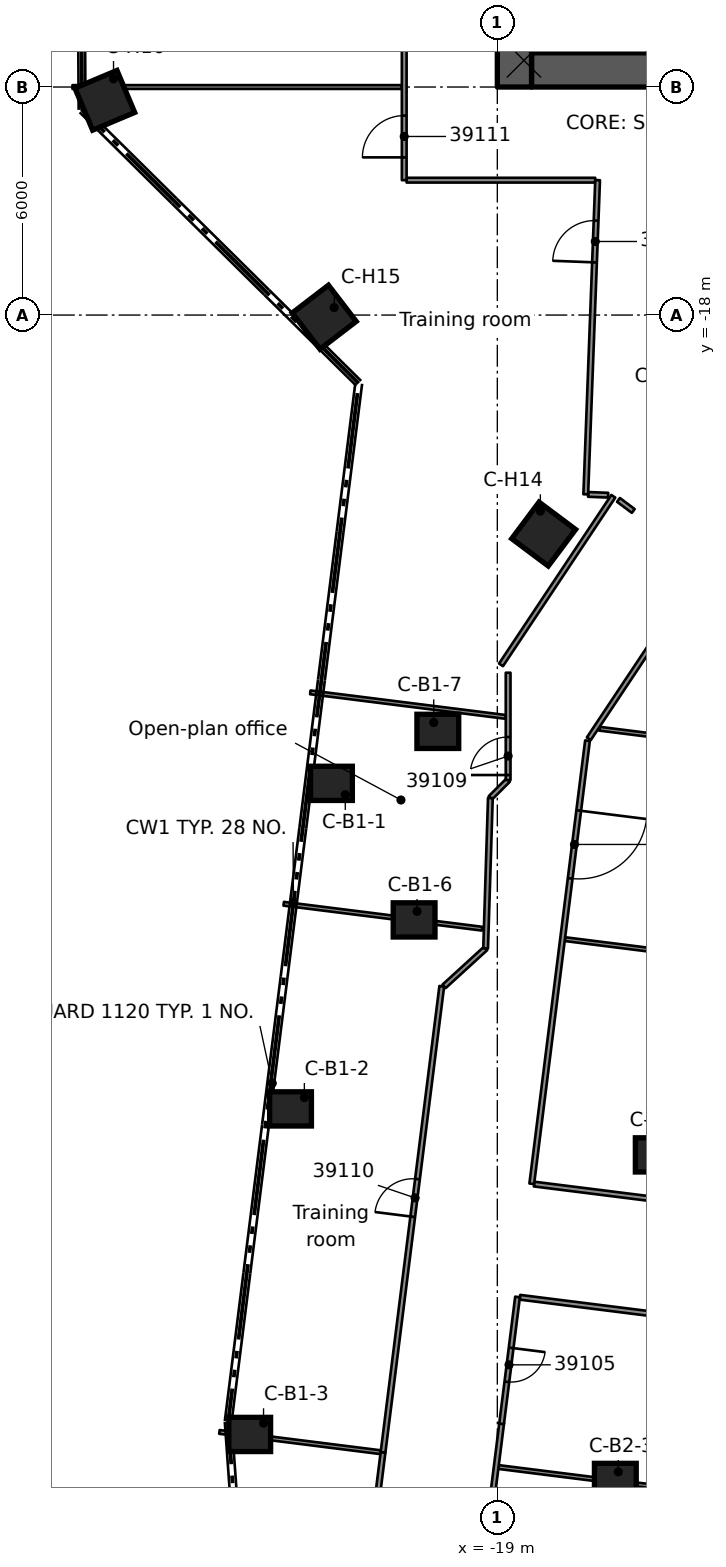
"""IFC4 building model, lengths in metres.
Left out: names, types, materials, properties, quantities, classifications, styles, units other than length and angle.
Written with IfcOpenShell. Run it as: python <this file> out.ifc"""

import sys

from ifc_helpers import new_model, si_unit, direction, frame, frame_2d, origin, origin_2d, place, context, subcontext, project, spatial, rectangle, extrude, element, fill, save


model = new_model("IFC4")
c1 = context("Model", 3, precision=1e-05, world=origin(), true_north=direction((0.0, 1.0)))
c2 = subcontext(c1, "Body", "Model", "MODEL_VIEW")
j1 = project(units=[si_unit("LENGTHUNIT", "METRE"), si_unit("PLANEANGLEUNIT", "RADIAN")], contexts=[c1])
p1 = place(None, origin())
s1 = spatial("IfcSite", under=j1, at=p1, CompositionType="ELEMENT")
p2 = place(p1, origin())
s2 = spatial("IfcBuilding", under=s1, at=p2, CompositionType="ELEMENT")
p3 = place(p2, frame((0.0, 0.0, 192.1)))
s3 = spatial("IfcBuildingStorey", under=s2, at=p3, CompositionType="ELEMENT", Elevation=192.1)
p4 = place(p3, frame((-18.1, -11.55, 0.0), z_axis=(0.0, 0.0, 1.0), x_axis=(1.0, 0.0, 0.0)))
e1 = element("IfcWall", 1, at=p4, inside=s3, PredefinedType="SHEAR", context=c2, shape_type="SweptSolid", body=[
    extrude(rectangle(XDim=9.2, YDim=0.9, at=frame_2d((4.6, 0.0))), origin(), (0.0, 0.0, 1.0), 3.5),
])
p5 = place(p4, frame((5.1, 0.0, 0.0)))
e2 = element("IfcOpeningElement", 2, at=p5, cuts=e1, PredefinedType="OPENING", context=c2, shape_type="SweptSolid", body=[
    extrude(rectangle(XDim=1.1, YDim=2.1, at=frame_2d((0.55, 1.05))), frame((0.0, 0.46, 0.0), z_axis=(0.0, -1.0, 0.0), x_axis=(1.0, 0.0, 0.0)), (0.0, 0.0, 1.0), 0.92),
])
p6 = place(p4, frame((7.53, 0.0, 0.0)))
e3 = element("IfcOpeningElement", 3, at=p6, cuts=e1, PredefinedType="OPENING", context=c2, shape_type="SweptSolid", body=[
    extrude(rectangle(XDim=0.9, YDim=2.1, at=frame_2d((0.45, 1.05))), frame((0.0, 0.46, 0.0), z_axis=(0.0, -1.0, 0.0), x_axis=(1.0, 0.0, 0.0)), (0.0, 0.0, 1.0), 0.92),
])
p7 = place(p3, frame((-18.55, -12.0, 0.0), z_axis=(0.0, 0.0, 1.0), x_axis=(0.0, 1.0, 0.0)))
e4 = element("IfcWall", 4, at=p7, inside=s3, PredefinedType="SHEAR", context=c2, shape_type="SweptSolid", body=[
    extrude(rectangle(XDim=24.0, YDim=0.9, at=frame_2d((12.0, 0.0))), origin(), (0.0, 0.0, 1.0), 3.5),
])
p8 = place(p7, frame((10.1, 0.0, 0.0)))
e5 = element("IfcOpeningElement", 5, at=p8, cuts=e4, PredefinedType="OPENING", context=c2, shape_type="SweptSolid", body=[
    extrude(rectangle(XDim=1.8, YDim=2.1, at=frame_2d((0.9, 1.05))), frame((0.0, 0.46, 0.0), z_axis=(0.0, -1.0, 0.0), x_axis=(1.0, 0.0, 0.0)), (0.0, 0.0, 1.0), 0.92),
])
for number, where, z_axis, x_axis in (
    (6, (-23.365, -30.322, 0.0), (0.0, 0.0, 1.0), (1.0, 0.0, 0.0)),
    (7, (-24.442, -38.888, 0.0), (0.0, 0.0, 1.0), (1.0, 0.0, 0.0)),
    (8, (-25.516, -47.454, 0.0), (0.0, 0.0, 1.0), (1.0, 0.0, 0.0)),
    (9, (-21.19, -33.915, 0.0), (0.0, 0.0, 1.0), (1.0, 0.0, 0.0)),
    (10, (-20.566, -28.954, 0.0), (0.0, 0.0, 1.0), (1.0, 0.0, 0.0)),
    (11, (-14.818, -40.098, 0.0), (0.0, 0.0, 1.0), (1.0, 0.0, 0.0)),
    (12, (-15.895, -48.664, 0.0), (0.0, 0.0, 1.0), (1.0, 0.0, 0.0)),
):
    element("IfcColumn", number, at=place(p3, frame(where, z_axis=z_axis, x_axis=x_axis)), inside=s3, PredefinedType="COLUMN", context=c2, shape_type="SweptSolid", body=[
        extrude(rectangle(XDim=1.1, YDim=0.9, at=origin_2d()), origin(), (0.0, 0.0, 1.0), 3.5),
    ])
for number, where, z_axis, x_axis in (
    (13, (-17.781, -23.763, 0.0), (0.0, 0.0, 1.0), (-0.599, -0.801, 0.0)),
    (14, (-23.555, -18.056, 0.0), (0.0, 0.0, 1.0), (-0.794, -0.608, 0.0)),
    (15, (-29.329, -12.349, 0.0), (0.0, 0.0, 1.0), (-0.922, -0.388, 0.0)),
):
    element("IfcColumn", number, at=place(p3, frame(where, z_axis=z_axis, x_axis=x_axis)), inside=s3, PredefinedType="COLUMN", context=c2, shape_type="SweptSolid", body=[
        extrude(rectangle(XDim=1.2, YDim=1.2, at=origin_2d()), origin(), (0.0, 0.0, 1.0), 3.5),
    ])
p9 = place(p3, frame((-15.812, -22.864, 0.0), z_axis=(0.0, 0.0, 1.0), x_axis=(0.800662960461, -0.599115033817, 0.0)))
e16 = element("IfcWall", 16, at=p9, inside=s3, PredefinedType="PARTITIONING", context=c2, shape_type="SweptSolid", body=[
    extrude(rectangle(XDim=0.486, YDim=0.125, at=frame_2d((0.243, 0.0))), origin(), (0.0, 0.0, 1.0), 3.06),
])
p10 = place(p3, frame((-26.313, -47.387, 0.0), z_axis=(0.0, 0.0, 1.0), x_axis=(0.992174773364, -0.124856794369, 0.0)))
e17 = element("IfcWall", 17, at=p10, inside=s3, PredefinedType="PARTITIONING", context=c2, shape_type="SweptSolid", body=[
    extrude(rectangle(XDim=4.276, YDim=0.1, at=frame_2d((2.138, 0.0))), origin(), (0.0, 0.0, 1.0), 3.06),
])
p11 = place(p3, frame((-18.968, -48.311, 0.0), z_axis=(0.0, 0.0, 1.0), x_axis=(0.992187328306, -0.124756985971, 0.0)))
e18 = element("IfcWall", 18, at=p11, inside=s3, PredefinedType="PARTITIONING", context=c2, shape_type="SweptSolid", body=[
    extrude(rectangle(XDim=25.585, YDim=0.1, at=frame_2d((12.792, 0.0))), origin(), (0.0, 0.0, 1.0), 3.06),
])
p12 = place(p3, frame((6.979, -47.035, 0.0), z_axis=(0.0, 0.0, 1.0), x_axis=(-0.992192052325, 0.124719410292, 0.0)))
e19 = element("IfcWall", 19, at=p12, inside=s3, PredefinedType="PARTITIONING", context=c2, shape_type="SweptSolid", body=[
    extrude(rectangle(XDim=25.585, YDim=0.125, at=frame_2d((12.792, 0.0))), origin(), (0.0, 0.0, 1.0), 3.06),
])
p13 = place(p12, frame((12.288, 0.0, 0.0)))
e20 = element("IfcOpeningElement", 20, at=p13, cuts=e19, PredefinedType="OPENING", context=c2, shape_type="SweptSolid", body=[
    extrude(rectangle(XDim=0.9, YDim=2.1, at=frame_2d((0.45, 1.05))), frame((0.0, 0.073, 0.0), z_axis=(0.0, -1.0, 0.0), x_axis=(1.0, 0.0, 0.0)), (0.0, 0.0, 1.0), 0.145),
])
p14 = place(p3, frame((-18.032, -40.866, 0.0), z_axis=(0.0, 0.0, 1.0), x_axis=(0.9922120451, -0.124560256738, 0.0)))
e21 = element("IfcWall", 21, at=p14, inside=s3, PredefinedType="PARTITIONING", context=c2, shape_type="SweptSolid", body=[
    extrude(rectangle(XDim=24.414, YDim=0.125, at=frame_2d((12.207, 0.0))), origin(), (0.0, 0.0, 1.0), 3.06),
])
p15 = place(p3, frame((-24.621, -33.49, 0.0), z_axis=(0.0, 0.0, 1.0), x_axis=(0.992192670487, -0.124714492473, 0.0)))
e22 = element("IfcWall", 22, at=p15, inside=s3, PredefinedType="PARTITIONING", context=c2, shape_type="SweptSolid", body=[
    extrude(rectangle(XDim=5.26, YDim=0.1, at=frame_2d((2.63, 0.0))), origin(), (0.0, 0.0, 1.0), 3.06),
])
p16 = place(p3, frame((-17.221, -34.421, 0.0), z_axis=(0.0, 0.0, 1.0), x_axis=(0.992190871449, -0.124728804262, 0.0)))
e23 = element("IfcWall", 23, at=p16, inside=s3, PredefinedType="PARTITIONING", context=c2, shape_type="SweptSolid", body=[
    extrude(rectangle(XDim=25.585, YDim=0.1, at=frame_2d((12.792, 0.0))), origin(), (0.0, 0.0, 1.0), 3.06),
])
p17 = place(p3, frame((-23.921, -27.927, 0.0), z_axis=(0.0, 0.0, 1.0), x_axis=(0.992179743224, -0.124817295018, 0.0)))
e24 = element("IfcWall", 24, at=p17, inside=s3, PredefinedType="PARTITIONING", context=c2, shape_type="SweptSolid", body=[
    extrude(rectangle(XDim=5.183, YDim=0.1, at=frame_2d((2.592, 0.0))), origin(), (0.0, 0.0, 1.0), 3.06),
])
p18 = place(p3, frame((-16.315, -28.884, 0.0), z_axis=(0.0, 0.0, 1.0), x_axis=(0.992194172305, -0.124702543857, 0.0)))
e25 = element("IfcWall", 25, at=p18, inside=s3, PredefinedType="PARTITIONING", context=c2, shape_type="SweptSolid", body=[
    extrude(rectangle(XDim=24.521, YDim=0.1, at=frame_2d((12.261, 0.0))), origin(), (0.0, 0.0, 1.0), 3.06),
])
p19 = place(p3, frame((-16.61, -22.719, 0.0), z_axis=(0.0, 0.0, 1.0), x_axis=(0.999204657851, -0.039875452703, 0.0)))
e26 = element("IfcWall", 26, at=p19, inside=s3, PredefinedType="PARTITIONING", context=c2, shape_type="SweptSolid", body=[
    extrude(rectangle(XDim=0.527, YDim=0.125, at=frame_2d((0.263, 0.0))), origin(), (0.0, 0.0, 1.0), 3.06),
])
p20 = place(p3, frame((-20.402, -35.664, 0.0), z_axis=(0.0, 0.0, 1.0), x_axis=(0.738431976745, 0.674327973408, 0.0)))
e27 = element("IfcWall", 27, at=p20, inside=s3, PredefinedType="PARTITIONING", context=c2, shape_type="SweptSolid", body=[
    extrude(rectangle(XDim=1.481, YDim=0.125, at=frame_2d((0.741, 0.0))), origin(), (0.0, 0.0, 1.0), 3.06),
])
p21 = place(p3, frame((-19.182, -30.703, 0.0), z_axis=(0.0, 0.0, 1.0), x_axis=(0.707106781187, 0.707106781187, 0.0)))
e28 = element("IfcWall", 28, at=p21, inside=s3, PredefinedType="PARTITIONING", context=c2, shape_type="SweptSolid", body=[
    extrude(rectangle(XDim=0.659, YDim=0.125, at=frame_2d((0.329, 0.0))), origin(), (0.0, 0.0, 1.0), 3.06),
])
p22 = place(p3, frame((-21.387, -14.451, 0.0), z_axis=(0.0, 0.0, 1.0), x_axis=(1.0, 0.0, 0.0)))
e29 = element("IfcWall", 29, at=p22, inside=s3, PredefinedType="PARTITIONING", context=c2, shape_type="SweptSolid", body=[
    extrude(rectangle(XDim=4.963, YDim=0.125, at=frame_2d((2.481, 0.0))), origin(), (0.0, 0.0, 1.0), 3.06),
])
p23 = place(p3, frame((-30.18, -12.0, 0.0), z_axis=(0.0, 0.0, 1.0), x_axis=(1.0, 0.0, 0.0)))
e30 = element("IfcWall", 30, at=p23, inside=s3, PredefinedType="PARTITIONING", context=c2, shape_type="SweptSolid", body=[
    extrude(rectangle(XDim=8.668, YDim=0.1, at=frame_2d((4.334, 0.0))), origin(), (0.0, 0.0, 1.0), 3.06),
])
p24 = place(p3, frame((-13.009, -23.769, 0.0), z_axis=(0.0, 0.0, 1.0), x_axis=(-0.554421269435, -0.832236178016, 0.0)))
e31 = element("IfcWall", 31, at=p24, inside=s3, PredefinedType="PARTITIONING", context=c2, shape_type="SweptSolid", body=[
    extrude(rectangle(XDim=6.464, YDim=0.125, at=frame_2d((3.232, 0.0))), origin(), (0.0, 0.0, 1.0), 3.06),
])
p25 = place(p3, frame((-15.948, -22.768, 0.0), z_axis=(0.0, 0.0, 1.0), x_axis=(-0.554404200785, -0.832247548601, 0.0)))
e32 = element("IfcWall", 32, at=p25, inside=s3, PredefinedType="PARTITIONING", context=c2, shape_type="SweptSolid", body=[
    extrude(rectangle(XDim=5.33, YDim=0.125, at=frame_2d((2.665, 0.0))), origin(), (0.0, 0.0, 1.0), 3.06),
])
p26 = place(p3, frame((-19.183, -30.708, 0.0), z_axis=(0.0, 0.0, 1.0), x_axis=(-0.0315735891, -0.99950142995, 0.0)))
e33 = element("IfcWall", 33, at=p26, inside=s3, PredefinedType="PARTITIONING", context=c2, shape_type="SweptSolid", body=[
    extrude(rectangle(XDim=3.959, YDim=0.125, at=frame_2d((1.979, 0.0))), origin(), (0.0, 0.0, 1.0), 3.06),
])
p27 = place(p3, frame((-18.884, -47.146, 0.0), z_axis=(0.0, 0.0, 1.0), x_axis=(-0.124739851626, -0.992189482617, 0.0)))
e34 = element("IfcWall", 34, at=p27, inside=s3, PredefinedType="PARTITIONING", context=c2, shape_type="SweptSolid", body=[
    extrude(rectangle(XDim=3.366, YDim=0.125, at=frame_2d((1.683, 0.0))), origin(), (0.0, 0.0, 1.0), 3.06),
])
p28 = place(p3, frame((-18.468, -43.836, 0.0), z_axis=(0.0, 0.0, 1.0), x_axis=(-0.124739851626, -0.992189482617, 0.0)))
e35 = element("IfcWall", 35, at=p28, inside=s3, PredefinedType="PARTITIONING", context=c2, shape_type="SweptSolid", body=[
    extrude(rectangle(XDim=3.366, YDim=0.125, at=frame_2d((1.683, 0.0))), origin(), (0.0, 0.0, 1.0), 3.06),
])
p29 = place(p28, frame((1.35, 0.0, 0.0)))
e36 = element("IfcOpeningElement", 36, at=p29, cuts=e35, PredefinedType="OPENING", context=c2, shape_type="SweptSolid", body=[
    extrude(rectangle(XDim=0.9, YDim=2.1, at=frame_2d((0.45, 1.05))), frame((0.0, 0.073, 0.0), z_axis=(0.0, -1.0, 0.0), x_axis=(1.0, 0.0, 0.0)), (0.0, 0.0, 1.0), 0.145),
])
p30 = place(p3, frame((-16.627, -29.199, 0.0), z_axis=(0.0, 0.0, 1.0), x_axis=(-0.124845291818, -0.992176220795, 0.0)))
e37 = element("IfcWall", 37, at=p30, inside=s3, PredefinedType="PARTITIONING", context=c2, shape_type="SweptSolid", body=[
    extrude(rectangle(XDim=11.751, YDim=0.125, at=frame_2d((5.875, 0.0))), origin(), (0.0, 0.0, 1.0), 3.06),
])
p31 = place(p30, frame((1.852, 0.0, 0.0)))
e38 = element("IfcOpeningElement", 38, at=p31, cuts=e37, PredefinedType="OPENING", context=c2, shape_type="SweptSolid", body=[
    extrude(rectangle(XDim=1.8, YDim=2.1, at=frame_2d((0.9, 1.05))), frame((0.0, 0.073, 0.0), z_axis=(0.0, -1.0, 0.0), x_axis=(1.0, 0.0, 0.0)), (0.0, 0.0, 1.0), 0.145),
])
p32 = place(p3, frame((-22.008, -47.929, 0.0), z_axis=(0.0, 0.0, 1.0), x_axis=(0.125040719406, 0.992151610637, 0.0)))
e39 = element("IfcWall", 39, at=p32, inside=s3, PredefinedType="PARTITIONING", context=c2, shape_type="SweptSolid", body=[
    extrude(rectangle(XDim=12.365, YDim=0.125, at=frame_2d((6.183, 0.0))), origin(), (0.0, 0.0, 1.0), 3.06),
])
p33 = place(p32, frame((6.252, 0.0, 0.0)))
e40 = element("IfcOpeningElement", 40, at=p33, cuts=e39, PredefinedType="OPENING", context=c2, shape_type="SweptSolid", body=[
    extrude(rectangle(XDim=1.0, YDim=2.1, at=frame_2d((0.5, 1.05))), frame((0.0, 0.073, 0.0), z_axis=(0.0, -1.0, 0.0), x_axis=(1.0, 0.0, 0.0)), (0.0, 0.0, 1.0), 0.145),
])
p34 = place(p3, frame((-22.008, -47.929, 0.0), z_axis=(0.0, 0.0, 1.0), x_axis=(-0.124647679963, -0.992201066256, 0.0)))
e41 = element("IfcWall", 41, at=p34, inside=s3, PredefinedType="PARTITIONING", context=c2, shape_type="SweptSolid", body=[
    extrude(rectangle(XDim=5.294, YDim=0.125, at=frame_2d((2.647, 0.0))), origin(), (0.0, 0.0, 1.0), 3.06),
])
p35 = place(p3, frame((-16.673, -22.717, 0.0), z_axis=(0.0, 0.0, 1.0), x_axis=(0.037714570023, 0.999288552525, 0.0)))
e42 = element("IfcWall", 42, at=p35, inside=s3, PredefinedType="PARTITIONING", context=c2, shape_type="SweptSolid", body=[
    extrude(rectangle(XDim=8.273, YDim=0.125, at=frame_2d((4.136, 0.0))), origin(), (0.0, 0.0, 1.0), 3.06),
])
p36 = place(p35, frame((6.108, 0.0, 0.0)))
e43 = element("IfcOpeningElement", 43, at=p36, cuts=e42, PredefinedType="OPENING", context=c2, shape_type="SweptSolid", body=[
    extrude(rectangle(XDim=1.1, YDim=2.1, at=frame_2d((0.55, 1.05))), frame((0.0, 0.073, 0.0), z_axis=(0.0, -1.0, 0.0), x_axis=(1.0, 0.0, 0.0)), (0.0, 0.0, 1.0), 0.145),
])
p37 = place(p3, frame((-18.716, -30.237, 0.0), z_axis=(0.0, 0.0, 1.0), x_axis=(0.0, 1.0, 0.0)))
e44 = element("IfcWall", 44, at=p37, inside=s3, PredefinedType="PARTITIONING", context=c2, shape_type="SweptSolid", body=[
    extrude(rectangle(XDim=2.826, YDim=0.125, at=frame_2d((1.413, 0.0))), origin(), (0.0, 0.0, 1.0), 3.06),
])
p38 = place(p37, frame((0.134, 0.0, 0.0)))
e45 = element("IfcOpeningElement", 45, at=p38, cuts=e44, PredefinedType="OPENING", context=c2, shape_type="SweptSolid", body=[
    extrude(rectangle(XDim=1.0, YDim=2.1, at=frame_2d((0.5, 1.05))), frame((0.0, 0.073, 0.0), z_axis=(0.0, -1.0, 0.0), x_axis=(1.0, 0.0, 0.0)), (0.0, 0.0, 1.0), 0.145),
])
p39 = place(p3, frame((-21.45, -14.451, 0.0), z_axis=(0.0, 0.0, 1.0), x_axis=(0.0, 1.0, 0.0)))
e46 = element("IfcWall", 46, at=p39, inside=s3, PredefinedType="PARTITIONING", context=c2, shape_type="SweptSolid", body=[
    extrude(rectangle(XDim=28.902, YDim=0.125, at=frame_2d((14.451, 0.0))), origin(), (0.0, 0.0, 1.0), 3.06),
])
p40 = place(p39, frame((0.6, 0.0, 0.0)))
e47 = element("IfcOpeningElement", 47, at=p40, cuts=e46, PredefinedType="OPENING", context=c2, shape_type="SweptSolid", body=[
    extrude(rectangle(XDim=1.1, YDim=2.1, at=frame_2d((0.55, 1.05))), frame((0.0, 0.073, 0.0), z_axis=(0.0, -1.0, 0.0), x_axis=(1.0, 0.0, 0.0)), (0.0, 0.0, 1.0), 0.145),
])
p41 = place(p39, frame((13.551, 0.0, 0.0)))
e48 = element("IfcOpeningElement", 48, at=p41, cuts=e46, PredefinedType="OPENING", context=c2, shape_type="SweptSolid", body=[
    extrude(rectangle(XDim=1.8, YDim=2.1, at=frame_2d((0.9, 1.05))), frame((0.0, 0.073, 0.0), z_axis=(0.0, -1.0, 0.0), x_axis=(1.0, 0.0, 0.0)), (0.0, 0.0, 1.0), 0.145),
])
p42 = place(p31, origin())
e49 = element("IfcDoor", 49, at=p42, inside=s3, OperationType="DOUBLE_DOOR_SINGLE_SWING", PredefinedType="DOOR", context=c2, shape_type="SweptSolid", body=[
    extrude(rectangle(XDim=1.8, YDim=2.1, at=frame_2d((0.9, 1.05))), frame((0.0, 0.025, 0.0), z_axis=(0.0, -1.0, 0.0), x_axis=(1.0, 0.0, 0.0)), (0.0, 0.0, 1.0), 0.05),
])
fill(e38, e49)
p43 = place(p29, origin())
e50 = element("IfcDoor", 50, at=p43, inside=s3, OperationType="SINGLE_SWING_RIGHT", PredefinedType="DOOR", context=c2, shape_type="SweptSolid", body=[
    extrude(rectangle(XDim=0.9, YDim=2.1, at=frame_2d((0.45, 1.05))), frame((0.0, 0.025, 0.0), z_axis=(0.0, -1.0, 0.0), x_axis=(1.0, 0.0, 0.0)), (0.0, 0.0, 1.0), 0.05),
])
fill(e36, e50)
p44 = place(p38, origin())
e51 = element("IfcDoor", 51, at=p44, inside=s3, OperationType="SINGLE_SWING_LEFT", PredefinedType="DOOR", context=c2, shape_type="SweptSolid", body=[
    extrude(rectangle(XDim=1.0, YDim=2.1, at=frame_2d((0.5, 1.05))), frame((0.0, 0.025, 0.0), z_axis=(0.0, -1.0, 0.0), x_axis=(1.0, 0.0, 0.0)), (0.0, 0.0, 1.0), 0.05),
])
fill(e45, e51)
p45 = place(p33, origin())
e52 = element("IfcDoor", 52, at=p45, inside=s3, OperationType="SINGLE_SWING_RIGHT", PredefinedType="DOOR", context=c2, shape_type="SweptSolid", body=[
    extrude(rectangle(XDim=1.0, YDim=2.1, at=frame_2d((0.5, 1.05))), frame((0.0, 0.025, 0.0), z_axis=(0.0, -1.0, 0.0), x_axis=(1.0, 0.0, 0.0)), (0.0, 0.0, 1.0), 0.05),
])
fill(e40, e52)
p46 = place(p40, origin())
e53 = element("IfcDoor", 53, at=p46, inside=s3, OperationType="SINGLE_SWING_LEFT", PredefinedType="DOOR", context=c2, shape_type="SweptSolid", body=[
    extrude(rectangle(XDim=1.1, YDim=2.1, at=frame_2d((0.55, 1.05))), frame((0.0, 0.025, 0.0), z_axis=(0.0, -1.0, 0.0), x_axis=(1.0, 0.0, 0.0)), (0.0, 0.0, 1.0), 0.05),
])
fill(e47, e53)
p47 = place(p36, origin())
e54 = element("IfcDoor", 54, at=p47, inside=s3, OperationType="SINGLE_SWING_RIGHT", PredefinedType="DOOR", context=c2, shape_type="SweptSolid", body=[
    extrude(rectangle(XDim=1.1, YDim=2.1, at=frame_2d((0.55, 1.05))), frame((0.0, 0.025, 0.0), z_axis=(0.0, -1.0, 0.0), x_axis=(1.0, 0.0, 0.0)), (0.0, 0.0, 1.0), 0.05),
])
fill(e43, e54)
save(model, sys.argv[1])
